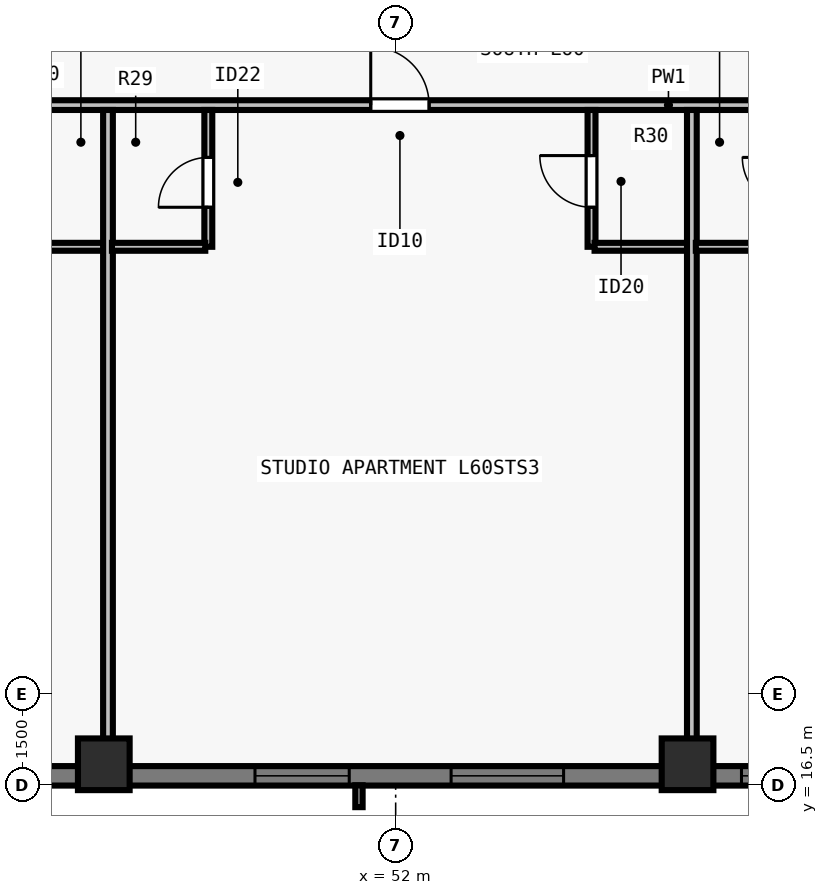
"""IFC4 building model, lengths in metres.
Left out: names, types, materials, properties, quantities, classifications, styles, units other than length and angle.
Written with IfcOpenShell. Run it as: python <this file> out.ifc"""

import sys

from ifc_helpers import new_model, si_unit, direction, frame, frame_2d, origin, origin_2d, place, context, subcontext, project, spatial, rectangle, extrude, element, fill, save


model = new_model("IFC4")
c1 = context("Model", 3, precision=1e-05, world=origin(), true_north=direction((0.0, 1.0)))
c2 = subcontext(c1, "Body", "Model", "MODEL_VIEW")
j1 = project(units=[si_unit("LENGTHUNIT", "METRE"), si_unit("PLANEANGLEUNIT", "RADIAN")], contexts=[c1])
p1 = place(None, origin())
s1 = spatial("IfcSite", under=j1, at=p1, CompositionType="ELEMENT")
p2 = place(p1, origin())
s2 = spatial("IfcBuilding", under=s1, at=p2, CompositionType="ELEMENT")
p3 = place(p2, frame((0.0, 0.0, 220.0)))
s3 = spatial("IfcBuildingStorey", under=s2, at=p3, CompositionType="ELEMENT", Elevation=220.0)
for number, where, z_axis, x_axis in (
    (1, (47.2, 16.85, 0.0), (0.0, 0.0, 1.0), (1.0, 0.0, 0.0)),
    (2, (56.8, 16.85, 0.0), (0.0, 0.0, 1.0), (1.0, 0.0, 0.0)),
):
    element("IfcColumn", number, at=place(p3, frame(where, z_axis=z_axis, x_axis=x_axis)), inside=s3, PredefinedType="COLUMN", context=c2, shape_type="SweptSolid", body=[
        extrude(rectangle(XDim=0.85, YDim=0.85, at=origin_2d()), origin(), (0.0, 0.0, 1.0), 3.5),
    ])
p4 = place(p3, frame((69.5, 16.66, 0.0), z_axis=(0.0, 0.0, 1.0), x_axis=(-1.0, 0.0, 0.0)))
e3 = element("IfcWall", 3, at=p4, inside=s3, PredefinedType="SOLIDWALL", context=c2, shape_type="SweptSolid", body=[
    extrude(rectangle(XDim=34.702, YDim=0.32, at=frame_2d((17.351, 0.0))), origin(), (0.0, 0.0, 1.0), 3.29),
])
p5 = place(p4, frame((5.213, 0.0, 0.8)))
e4 = element("IfcOpeningElement", 4, at=p5, cuts=e3, PredefinedType="OPENING", context=c2, shape_type="SweptSolid", body=[
    extrude(rectangle(XDim=1.55, YDim=1.678, at=frame_2d((0.775, 0.839))), frame((0.0, 0.17, 0.0), z_axis=(0.0, -1.0, 0.0), x_axis=(1.0, 0.0, 0.0)), (0.0, 0.0, 1.0), 0.34),
])
p6 = place(p4, frame((7.988, 0.0, 0.8)))
e5 = element("IfcOpeningElement", 5, at=p6, cuts=e3, PredefinedType="OPENING", context=c2, shape_type="SweptSolid", body=[
    extrude(rectangle(XDim=1.85, YDim=1.678, at=frame_2d((0.925, 0.839))), frame((0.0, 0.17, 0.0), z_axis=(0.0, -1.0, 0.0), x_axis=(1.0, 0.0, 0.0)), (0.0, 0.0, 1.0), 0.34),
])
p7 = place(p4, frame((10.263, 0.0, 0.8)))
e6 = element("IfcOpeningElement", 6, at=p7, cuts=e3, PredefinedType="OPENING", context=c2, shape_type="SweptSolid", body=[
    extrude(rectangle(XDim=1.55, YDim=1.678, at=frame_2d((0.775, 0.839))), frame((0.0, 0.17, 0.0), z_axis=(0.0, -1.0, 0.0), x_axis=(1.0, 0.0, 0.0)), (0.0, 0.0, 1.0), 0.34),
])
p8 = place(p4, frame((14.738, 0.0, 0.8)))
e7 = element("IfcOpeningElement", 7, at=p8, cuts=e3, PredefinedType="OPENING", context=c2, shape_type="SweptSolid", body=[
    extrude(rectangle(XDim=1.85, YDim=1.678, at=frame_2d((0.925, 0.839))), frame((0.0, 0.17, 0.0), z_axis=(0.0, -1.0, 0.0), x_axis=(1.0, 0.0, 0.0)), (0.0, 0.0, 1.0), 0.34),
])
p9 = place(p4, frame((18.264, 0.0, 0.8)))
e8 = element("IfcOpeningElement", 8, at=p9, cuts=e3, PredefinedType="OPENING", context=c2, shape_type="SweptSolid", body=[
    extrude(rectangle(XDim=1.55, YDim=1.678, at=frame_2d((0.775, 0.839))), frame((0.0, 0.17, 0.0), z_axis=(0.0, -1.0, 0.0), x_axis=(1.0, 0.0, 0.0)), (0.0, 0.0, 1.0), 0.34),
])
p10 = place(p4, frame((25.014, 0.0, 0.8)))
e9 = element("IfcOpeningElement", 9, at=p10, cuts=e3, PredefinedType="OPENING", context=c2, shape_type="SweptSolid", body=[
    extrude(rectangle(XDim=1.55, YDim=1.678, at=frame_2d((0.775, 0.839))), frame((0.0, 0.17, 0.0), z_axis=(0.0, -1.0, 0.0), x_axis=(1.0, 0.0, 0.0)), (0.0, 0.0, 1.0), 0.34),
])
p11 = place(p4, frame((27.789, 0.0, 0.8)))
e10 = element("IfcOpeningElement", 10, at=p11, cuts=e3, PredefinedType="OPENING", context=c2, shape_type="SweptSolid", body=[
    extrude(rectangle(XDim=1.85, YDim=1.678, at=frame_2d((0.925, 0.839))), frame((0.0, 0.17, 0.0), z_axis=(0.0, -1.0, 0.0), x_axis=(1.0, 0.0, 0.0)), (0.0, 0.0, 1.0), 0.34),
])
p12 = place(p4, frame((30.71, 0.0, 0.8)))
e11 = element("IfcOpeningElement", 11, at=p12, cuts=e3, PredefinedType="OPENING", context=c2, shape_type="SweptSolid", body=[
    extrude(rectangle(XDim=0.9, YDim=1.678, at=frame_2d((0.45, 0.839))), frame((0.0, 0.17, 0.0), z_axis=(0.0, -1.0, 0.0), x_axis=(1.0, 0.0, 0.0)), (0.0, 0.0, 1.0), 0.34),
])
p13 = place(p3, frame((29.805, 27.69, 0.0), z_axis=(0.0, 0.0, 1.0), x_axis=(1.0, 0.0, 0.0)))
e12 = element("IfcWall", 12, at=p13, inside=s3, PredefinedType="PARTITIONING", context=c2, shape_type="SweptSolid", body=[
    extrude(rectangle(XDim=44.39, YDim=0.16, at=frame_2d((22.195, 0.0))), origin(), (0.0, 0.0, 1.0), 2.958),
])
p14 = place(p13, frame((4.279, 0.0, 0.0)))
e13 = element("IfcOpeningElement", 13, at=p14, cuts=e12, PredefinedType="OPENING", context=c2, shape_type="SweptSolid", body=[
    extrude(rectangle(XDim=0.96, YDim=2.18, at=frame_2d((0.48, 1.09))), frame((0.0, 0.09, 0.0), z_axis=(0.0, -1.0, 0.0), x_axis=(1.0, 0.0, 0.0)), (0.0, 0.0, 1.0), 0.18),
])
p15 = place(p13, frame((12.953, 0.0, 0.0)))
e14 = element("IfcOpeningElement", 14, at=p15, cuts=e12, PredefinedType="OPENING", context=c2, shape_type="SweptSolid", body=[
    extrude(rectangle(XDim=0.96, YDim=2.18, at=frame_2d((0.48, 1.09))), frame((0.0, 0.09, 0.0), z_axis=(0.0, -1.0, 0.0), x_axis=(1.0, 0.0, 0.0)), (0.0, 0.0, 1.0), 0.18),
])
p16 = place(p13, frame((21.785, 0.0, 0.0)))
e15 = element("IfcOpeningElement", 15, at=p16, cuts=e12, PredefinedType="OPENING", context=c2, shape_type="SweptSolid", body=[
    extrude(rectangle(XDim=0.96, YDim=2.18, at=frame_2d((0.48, 1.09))), frame((0.0, 0.09, 0.0), z_axis=(0.0, -1.0, 0.0), x_axis=(1.0, 0.0, 0.0)), (0.0, 0.0, 1.0), 0.18),
])
p17 = place(p13, frame((30.617, 0.0, 0.0)))
e16 = element("IfcOpeningElement", 16, at=p17, cuts=e12, PredefinedType="OPENING", context=c2, shape_type="SweptSolid", body=[
    extrude(rectangle(XDim=0.96, YDim=2.18, at=frame_2d((0.48, 1.09))), frame((0.0, 0.09, 0.0), z_axis=(0.0, -1.0, 0.0), x_axis=(1.0, 0.0, 0.0)), (0.0, 0.0, 1.0), 0.18),
])
p18 = place(p13, frame((39.221, 0.0, 0.0)))
e17 = element("IfcOpeningElement", 17, at=p18, cuts=e12, PredefinedType="OPENING", context=c2, shape_type="SweptSolid", body=[
    extrude(rectangle(XDim=0.96, YDim=2.18, at=frame_2d((0.48, 1.09))), frame((0.0, 0.09, 0.0), z_axis=(0.0, -1.0, 0.0), x_axis=(1.0, 0.0, 0.0)), (0.0, 0.0, 1.0), 0.18),
])
p19 = place(p3, frame((45.669, 25.36, 0.0), z_axis=(0.0, 0.0, 1.0), x_axis=(1.0, 0.0, 0.0)))
e18 = element("IfcWall", 18, at=p19, inside=s3, PredefinedType="PLUMBINGWALL", context=c2, shape_type="SweptSolid", body=[
    extrude(rectangle(XDim=1.6, YDim=0.13, at=frame_2d((0.8, 0.0))), origin(), (0.0, 0.0, 1.0), 3.29),
])
p20 = place(p3, frame((47.269, 16.805, 0.0), z_axis=(0.0, 0.0, 1.0), x_axis=(0.0, 1.0, 0.0)))
e19 = element("IfcWall", 19, at=p20, inside=s3, PredefinedType="PARTITIONING", context=c2, shape_type="SweptSolid", body=[
    extrude(rectangle(XDim=10.805, YDim=0.16, at=frame_2d((5.403, 0.0))), origin(), (0.0, 0.0, 1.0), 2.573),
])
p21 = place(p3, frame((48.919, 25.36, 0.0), z_axis=(0.0, 0.0, 1.0), x_axis=(0.0, 1.0, 0.0)))
e20 = element("IfcWall", 20, at=p21, inside=s3, PredefinedType="PLUMBINGWALL", context=c2, shape_type="SweptSolid", body=[
    extrude(rectangle(XDim=2.25, YDim=0.13, at=frame_2d((1.125, 0.0))), origin(), (0.0, 0.0, 1.0), 3.29),
])
p22 = place(p21, frame((0.65, 0.0, 0.0)))
e21 = element("IfcOpeningElement", 21, at=p22, cuts=e20, PredefinedType="OPENING", context=c2, shape_type="SweptSolid", body=[
    extrude(rectangle(XDim=0.82, YDim=2.1, at=frame_2d((0.41, 1.05))), frame((0.0, 0.075, 0.0), z_axis=(0.0, -1.0, 0.0), x_axis=(1.0, 0.0, 0.0)), (0.0, 0.0, 1.0), 0.15),
])
p23 = place(p3, frame((47.334, 25.36, 0.0), z_axis=(0.0, 0.0, 1.0), x_axis=(1.0, 0.0, 0.0)))
e22 = element("IfcWall", 22, at=p23, inside=s3, PredefinedType="PLUMBINGWALL", context=c2, shape_type="SweptSolid", body=[
    extrude(rectangle(XDim=1.535, YDim=0.13, at=frame_2d((0.768, 0.0))), origin(), (0.0, 0.0, 1.0), 3.29),
])
p24 = place(p3, frame((55.221, 25.36, 0.0), z_axis=(0.0, 0.0, 1.0), x_axis=(0.0, 1.0, 0.0)))
e23 = element("IfcWall", 23, at=p24, inside=s3, PredefinedType="PLUMBINGWALL", context=c2, shape_type="SweptSolid", body=[
    extrude(rectangle(XDim=2.25, YDim=0.13, at=frame_2d((1.125, 0.0))), origin(), (0.0, 0.0, 1.0), 3.29),
])
p25 = place(p24, frame((0.65, 0.0, 0.0)))
e24 = element("IfcOpeningElement", 24, at=p25, cuts=e23, PredefinedType="OPENING", context=c2, shape_type="SweptSolid", body=[
    extrude(rectangle(XDim=0.85, YDim=2.1, at=frame_2d((0.425, 1.05))), frame((0.0, 0.075, 0.0), z_axis=(0.0, -1.0, 0.0), x_axis=(1.0, 0.0, 0.0)), (0.0, 0.0, 1.0), 0.15),
])
p26 = place(p3, frame((55.271, 25.36, 0.0), z_axis=(0.0, 0.0, 1.0), x_axis=(1.0, 0.0, 0.0)))
e25 = element("IfcWall", 25, at=p26, inside=s3, PredefinedType="PLUMBINGWALL", context=c2, shape_type="SweptSolid", body=[
    extrude(rectangle(XDim=1.6, YDim=0.13, at=frame_2d((0.8, 0.0))), origin(), (0.0, 0.0, 1.0), 3.29),
])
p27 = place(p3, frame((56.871, 16.805, 0.0), z_axis=(0.0, 0.0, 1.0), x_axis=(0.0, 1.0, 0.0)))
e26 = element("IfcWall", 26, at=p27, inside=s3, PredefinedType="PARTITIONING", context=c2, shape_type="SweptSolid", body=[
    extrude(rectangle(XDim=10.805, YDim=0.16, at=frame_2d((5.403, 0.0))), origin(), (0.0, 0.0, 1.0), 2.573),
])
p28 = place(p3, frame((56.936, 25.36, 0.0), z_axis=(0.0, 0.0, 1.0), x_axis=(1.0, 0.0, 0.0)))
e27 = element("IfcWall", 27, at=p28, inside=s3, PredefinedType="PLUMBINGWALL", context=c2, shape_type="SweptSolid", body=[
    extrude(rectangle(XDim=1.535, YDim=0.13, at=frame_2d((0.768, 0.0))), origin(), (0.0, 0.0, 1.0), 3.29),
])
p29 = place(p7, origin())
e28 = element("IfcWindow", 28, at=p29, inside=s3, PartitioningType="SINGLE_PANEL", PredefinedType="WINDOW", context=c2, shape_type="SweptSolid", body=[
    extrude(rectangle(XDim=1.55, YDim=1.678, at=frame_2d((0.775, 0.839))), frame((0.0, -0.05, 0.0), z_axis=(0.0, -1.0, 0.0), x_axis=(1.0, 0.0, 0.0)), (0.0, 0.0, 1.0), 0.06),
])
fill(e6, e28)
p30 = place(p8, origin())
e29 = element("IfcWindow", 29, at=p30, inside=s3, PartitioningType="SINGLE_PANEL", PredefinedType="WINDOW", context=c2, shape_type="SweptSolid", body=[
    extrude(rectangle(XDim=1.85, YDim=1.678, at=frame_2d((0.925, 0.839))), frame((0.0, -0.05, 0.0), z_axis=(0.0, -1.0, 0.0), x_axis=(1.0, 0.0, 0.0)), (0.0, 0.0, 1.0), 0.06),
])
fill(e7, e29)
p31 = place(p9, origin())
e30 = element("IfcWindow", 30, at=p31, inside=s3, PartitioningType="SINGLE_PANEL", PredefinedType="WINDOW", context=c2, shape_type="SweptSolid", body=[
    extrude(rectangle(XDim=1.55, YDim=1.678, at=frame_2d((0.775, 0.839))), frame((0.0, -0.05, 0.0), z_axis=(0.0, -1.0, 0.0), x_axis=(1.0, 0.0, 0.0)), (0.0, 0.0, 1.0), 0.06),
])
fill(e8, e30)
p32 = place(p22, origin())
e31 = element("IfcDoor", 31, at=p32, inside=s3, OperationType="SINGLE_SWING_LEFT", PredefinedType="DOOR", context=c2, shape_type="SweptSolid", body=[
    extrude(rectangle(XDim=0.82, YDim=2.1, at=frame_2d((0.41, 1.05))), frame((0.0, 0.025, 0.0), z_axis=(0.0, -1.0, 0.0), x_axis=(1.0, 0.0, 0.0)), (0.0, 0.0, 1.0), 0.05),
])
fill(e21, e31)
p33 = place(p25, origin())
e32 = element("IfcDoor", 32, at=p33, inside=s3, OperationType="SINGLE_SWING_RIGHT", PredefinedType="DOOR", context=c2, shape_type="SweptSolid", body=[
    extrude(rectangle(XDim=0.85, YDim=2.1, at=frame_2d((0.425, 1.05))), frame((0.0, 0.025, 0.0), z_axis=(0.0, -1.0, 0.0), x_axis=(1.0, 0.0, 0.0)), (0.0, 0.0, 1.0), 0.05),
])
fill(e24, e32)
p34 = place(p16, origin())
e33 = element("IfcDoor", 33, at=p34, inside=s3, OperationType="SINGLE_SWING_LEFT", PredefinedType="DOOR", context=c2, shape_type="SweptSolid", body=[
    extrude(rectangle(XDim=0.96, YDim=2.18, at=frame_2d((0.48, 1.09))), frame((0.0, 0.025, 0.0), z_axis=(0.0, -1.0, 0.0), x_axis=(1.0, 0.0, 0.0)), (0.0, 0.0, 1.0), 0.05),
])
fill(e15, e33)
save(model, sys.argv[1])
